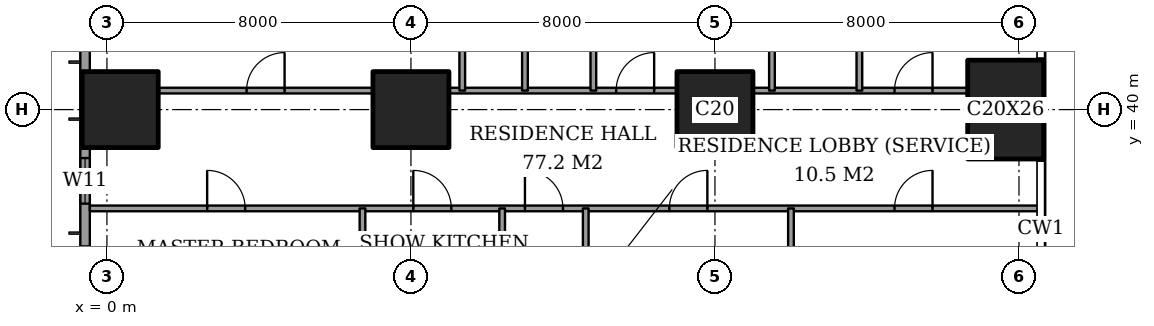
"""IFC4 building model, lengths in metres.
Left out: names, types, materials, properties, quantities, classifications, styles, units other than length and angle.
Written with IfcOpenShell. Run it as: python <this file> out.ifc"""

import sys

from ifc_helpers import new_model, si_unit, direction, frame, frame_2d, origin, origin_2d, place, context, subcontext, project, spatial, rectangle, extrude, element, fill, save


model = new_model("IFC4")
c1 = context("Model", 3, precision=1e-05, world=origin(), true_north=direction((0.0, 1.0)))
c2 = subcontext(c1, "Body", "Model", "MODEL_VIEW")
j1 = project(units=[si_unit("LENGTHUNIT", "METRE"), si_unit("PLANEANGLEUNIT", "RADIAN")], contexts=[c1])
p1 = place(None, origin())
s1 = spatial("IfcSite", under=j1, at=p1, CompositionType="ELEMENT")
p2 = place(p1, origin())
s2 = spatial("IfcBuilding", under=s1, at=p2, CompositionType="ELEMENT")
p3 = place(p2, frame((0.0, 0.0, 168.2)))
s3 = spatial("IfcBuildingStorey", under=s2, at=p3, CompositionType="ELEMENT", Elevation=168.2)
for number, where, z_axis, x_axis in (
    (1, (0.35, 40.0, 0.0), (0.0, 0.0, 1.0), (1.0, 0.0, 0.0)),
    (2, (8.0, 40.0, 0.0), (0.0, 0.0, 1.0), (1.0, 0.0, 0.0)),
    (3, (16.0, 40.0, 0.0), (0.0, 0.0, 1.0), (1.0, 0.0, 0.0)),
):
    element("IfcColumn", number, at=place(p3, frame(where, z_axis=z_axis, x_axis=x_axis)), inside=s3, PredefinedType="COLUMN", context=c2, shape_type="SweptSolid", body=[
        extrude(rectangle(XDim=2.0, YDim=2.0, at=origin_2d()), origin(), (0.0, 0.0, 1.0), 3.6),
    ])
p4 = place(p3, frame((23.65, 40.0, 0.0), z_axis=(0.0, 0.0, 1.0), x_axis=(1.0, 0.0, 0.0)))
e4 = element("IfcColumn", 4, at=p4, inside=s3, PredefinedType="COLUMN", context=c2, shape_type="SweptSolid", body=[
    extrude(rectangle(XDim=2.0, YDim=2.6, at=origin_2d()), origin(), (0.0, 0.0, 1.0), 3.6),
])
p5 = place(p3, frame((-0.575, 44.825, 0.0), z_axis=(0.0, 0.0, 1.0), x_axis=(0.0, -1.0, 0.0)))
e5 = element("IfcWall", 5, at=p5, inside=s3, PredefinedType="SOLIDWALL", context=c2, shape_type="SweptSolid", body=[
    extrude(rectangle(XDim=41.65, YDim=0.25, at=frame_2d((20.825, 0.0))), origin(), (0.0, 0.0, 1.0), 3.6),
])
p6 = place(p5, frame((0.775, 0.0, 0.4)))
e6 = element("IfcOpeningElement", 6, at=p6, cuts=e5, PredefinedType="OPENING", context=c2, shape_type="SweptSolid", body=[
    extrude(rectangle(XDim=2.4, YDim=2.2, at=frame_2d((1.2, 1.1))), frame((0.0, 0.135, 0.0), z_axis=(0.0, -1.0, 0.0), x_axis=(1.0, 0.0, 0.0)), (0.0, 0.0, 1.0), 0.27),
])
p7 = place(p5, frame((6.1, 0.0, 0.4)))
e7 = element("IfcOpeningElement", 7, at=p7, cuts=e5, PredefinedType="OPENING", context=c2, shape_type="SweptSolid", body=[
    extrude(rectangle(XDim=1.2, YDim=2.2, at=frame_2d((0.6, 1.1))), frame((0.0, 0.135, 0.0), z_axis=(0.0, -1.0, 0.0), x_axis=(1.0, 0.0, 0.0)), (0.0, 0.0, 1.0), 0.27),
])
p8 = place(p5, frame((8.425, 0.0, 0.4)))
e8 = element("IfcOpeningElement", 8, at=p8, cuts=e5, PredefinedType="OPENING", context=c2, shape_type="SweptSolid", body=[
    extrude(rectangle(XDim=2.4, YDim=2.2, at=frame_2d((1.2, 1.1))), frame((0.0, 0.135, 0.0), z_axis=(0.0, -1.0, 0.0), x_axis=(1.0, 0.0, 0.0)), (0.0, 0.0, 1.0), 0.27),
])
p9 = place(p5, frame((15.625, 0.0, 0.4)))
e9 = element("IfcOpeningElement", 9, at=p9, cuts=e5, PredefinedType="OPENING", context=c2, shape_type="SweptSolid", body=[
    extrude(rectangle(XDim=2.4, YDim=2.2, at=frame_2d((1.2, 1.1))), frame((0.0, 0.135, 0.0), z_axis=(0.0, -1.0, 0.0), x_axis=(1.0, 0.0, 0.0)), (0.0, 0.0, 1.0), 0.27),
])
p10 = place(p5, frame((23.625, 0.0, 0.4)))
e10 = element("IfcOpeningElement", 10, at=p10, cuts=e5, PredefinedType="OPENING", context=c2, shape_type="SweptSolid", body=[
    extrude(rectangle(XDim=2.4, YDim=2.2, at=frame_2d((1.2, 1.1))), frame((0.0, 0.135, 0.0), z_axis=(0.0, -1.0, 0.0), x_axis=(1.0, 0.0, 0.0)), (0.0, 0.0, 1.0), 0.27),
])
p11 = place(p5, frame((30.825, 0.0, 0.4)))
e11 = element("IfcOpeningElement", 11, at=p11, cuts=e5, PredefinedType="OPENING", context=c2, shape_type="SweptSolid", body=[
    extrude(rectangle(XDim=2.4, YDim=2.2, at=frame_2d((1.2, 1.1))), frame((0.0, 0.135, 0.0), z_axis=(0.0, -1.0, 0.0), x_axis=(1.0, 0.0, 0.0)), (0.0, 0.0, 1.0), 0.27),
])
p12 = place(p5, frame((34.5, 0.0, 0.4)))
e12 = element("IfcOpeningElement", 12, at=p12, cuts=e5, PredefinedType="OPENING", context=c2, shape_type="SweptSolid", body=[
    extrude(rectangle(XDim=1.2, YDim=2.2, at=frame_2d((0.6, 1.1))), frame((0.0, 0.135, 0.0), z_axis=(0.0, -1.0, 0.0), x_axis=(1.0, 0.0, 0.0)), (0.0, 0.0, 1.0), 0.27),
])
p13 = place(p5, frame((38.475, 0.0, 0.4)))
e13 = element("IfcOpeningElement", 13, at=p13, cuts=e5, PredefinedType="OPENING", context=c2, shape_type="SweptSolid", body=[
    extrude(rectangle(XDim=2.4, YDim=2.2, at=frame_2d((1.2, 1.1))), frame((0.0, 0.135, 0.0), z_axis=(0.0, -1.0, 0.0), x_axis=(1.0, 0.0, 0.0)), (0.0, 0.0, 1.0), 0.27),
])
p14 = place(p3, frame((-0.45, 37.4, 0.0), z_axis=(0.0, 0.0, 1.0), x_axis=(1.0, 0.0, 0.0)))
e14 = element("IfcWall", 14, at=p14, inside=s3, PredefinedType="PARTITIONING", context=c2, shape_type="SweptSolid", body=[
    extrude(rectangle(XDim=25.011, YDim=0.15, at=frame_2d((12.505, 0.0))), origin(), (0.0, 0.0, 1.0), 3.25),
])
p15 = place(p14, frame((11.45, 0.0, 0.0)))
e15 = element("IfcOpeningElement", 15, at=p15, cuts=e14, PredefinedType="OPENING", context=c2, shape_type="SweptSolid", body=[
    extrude(rectangle(XDim=1.0, YDim=2.1, at=frame_2d((0.5, 1.05))), frame((0.0, 0.085, 0.0), z_axis=(0.0, -1.0, 0.0), x_axis=(1.0, 0.0, 0.0)), (0.0, 0.0, 1.0), 0.17),
])
p16 = place(p14, frame((3.087, 0.0, 0.0)))
e16 = element("IfcOpeningElement", 16, at=p16, cuts=e14, PredefinedType="OPENING", context=c2, shape_type="SweptSolid", body=[
    extrude(rectangle(XDim=1.0, YDim=2.1, at=frame_2d((0.5, 1.05))), frame((0.0, 0.085, 0.0), z_axis=(0.0, -1.0, 0.0), x_axis=(1.0, 0.0, 0.0)), (0.0, 0.0, 1.0), 0.17),
])
p17 = place(p14, frame((8.512, 0.0, 0.0)))
e17 = element("IfcOpeningElement", 17, at=p17, cuts=e14, PredefinedType="OPENING", context=c2, shape_type="SweptSolid", body=[
    extrude(rectangle(XDim=1.0, YDim=2.1, at=frame_2d((0.5, 1.05))), frame((0.0, 0.085, 0.0), z_axis=(0.0, -1.0, 0.0), x_axis=(1.0, 0.0, 0.0)), (0.0, 0.0, 1.0), 0.17),
])
p18 = place(p14, frame((15.25, 0.0, 0.0)))
e18 = element("IfcOpeningElement", 18, at=p18, cuts=e14, PredefinedType="OPENING", context=c2, shape_type="SweptSolid", body=[
    extrude(rectangle(XDim=1.0, YDim=2.1, at=frame_2d((0.5, 1.05))), frame((0.0, 0.085, 0.0), z_axis=(0.0, -1.0, 0.0), x_axis=(1.0, 0.0, 0.0)), (0.0, 0.0, 1.0), 0.17),
])
p19 = place(p14, frame((21.175, 0.0, 0.0)))
e19 = element("IfcOpeningElement", 19, at=p19, cuts=e14, PredefinedType="OPENING", context=c2, shape_type="SweptSolid", body=[
    extrude(rectangle(XDim=1.0, YDim=2.1, at=frame_2d((0.5, 1.05))), frame((0.0, 0.085, 0.0), z_axis=(0.0, -1.0, 0.0), x_axis=(1.0, 0.0, 0.0)), (0.0, 0.0, 1.0), 0.17),
])
p20 = place(p3, frame((1.35, 40.5, 0.0), z_axis=(0.0, 0.0, 1.0), x_axis=(1.0, 0.0, 0.0)))
e20 = element("IfcWall", 20, at=p20, inside=s3, PredefinedType="PARTITIONING", context=c2, shape_type="SweptSolid", body=[
    extrude(rectangle(XDim=5.65, YDim=0.15, at=frame_2d((2.825, 0.0))), origin(), (0.0, 0.0, 1.0), 3.25),
])
p21 = place(p20, frame((2.325, 0.0, 0.0)))
e21 = element("IfcOpeningElement", 21, at=p21, cuts=e20, PredefinedType="OPENING", context=c2, shape_type="SweptSolid", body=[
    extrude(rectangle(XDim=1.0, YDim=2.1, at=frame_2d((0.5, 1.05))), frame((0.0, 0.085, 0.0), z_axis=(0.0, -1.0, 0.0), x_axis=(1.0, 0.0, 0.0)), (0.0, 0.0, 1.0), 0.17),
])
p22 = place(p3, frame((9.0, 40.5, 0.0), z_axis=(0.0, 0.0, 1.0), x_axis=(1.0, 0.0, 0.0)))
e22 = element("IfcWall", 22, at=p22, inside=s3, PredefinedType="PARTITIONING", context=c2, shape_type="SweptSolid", body=[
    extrude(rectangle(XDim=6.0, YDim=0.15, at=frame_2d((3.0, 0.0))), origin(), (0.0, 0.0, 1.0), 3.25),
])
p23 = place(p22, frame((4.4, 0.0, 0.0)))
e23 = element("IfcOpeningElement", 23, at=p23, cuts=e22, PredefinedType="OPENING", context=c2, shape_type="SweptSolid", body=[
    extrude(rectangle(XDim=1.0, YDim=2.1, at=frame_2d((0.5, 1.05))), frame((0.0, 0.085, 0.0), z_axis=(0.0, -1.0, 0.0), x_axis=(1.0, 0.0, 0.0)), (0.0, 0.0, 1.0), 0.17),
])
p24 = place(p3, frame((17.0, 40.5, 0.0), z_axis=(0.0, 0.0, 1.0), x_axis=(1.0, 0.0, 0.0)))
e24 = element("IfcWall", 24, at=p24, inside=s3, PredefinedType="PARTITIONING", context=c2, shape_type="SweptSolid", body=[
    extrude(rectangle(XDim=5.65, YDim=0.15, at=frame_2d((2.825, 0.0))), origin(), (0.0, 0.0, 1.0), 3.25),
])
p25 = place(p24, frame((3.725, 0.0, 0.0)))
e25 = element("IfcOpeningElement", 25, at=p25, cuts=e24, PredefinedType="OPENING", context=c2, shape_type="SweptSolid", body=[
    extrude(rectangle(XDim=1.0, YDim=2.1, at=frame_2d((0.5, 1.05))), frame((0.0, 0.085, 0.0), z_axis=(0.0, -1.0, 0.0), x_axis=(1.0, 0.0, 0.0)), (0.0, 0.0, 1.0), 0.17),
])
p26 = place(p3, frame((6.725, 33.2, 0.0), z_axis=(0.0, 0.0, 1.0), x_axis=(0.0, 1.0, 0.0)))
e26 = element("IfcWall", 26, at=p26, inside=s3, PredefinedType="PARTITIONING", context=c2, shape_type="SweptSolid", body=[
    extrude(rectangle(XDim=4.2, YDim=0.15, at=frame_2d((2.1, 0.0))), origin(), (0.0, 0.0, 1.0), 3.25),
])
p27 = place(p3, frame((9.35, 40.5, 0.0), z_axis=(0.0, 0.0, 1.0), x_axis=(0.0, 1.0, 0.0)))
e27 = element("IfcWall", 27, at=p27, inside=s3, PredefinedType="PARTITIONING", context=c2, shape_type="SweptSolid", body=[
    extrude(rectangle(XDim=7.95, YDim=0.15, at=frame_2d((3.975, 0.0))), origin(), (0.0, 0.0, 1.0), 3.25),
])
p28 = place(p27, frame((3.525, 0.0, 0.0)))
e28 = element("IfcOpeningElement", 28, at=p28, cuts=e27, PredefinedType="OPENING", context=c2, shape_type="SweptSolid", body=[
    extrude(rectangle(XDim=0.9, YDim=2.1, at=frame_2d((0.45, 1.05))), frame((0.0, 0.085, 0.0), z_axis=(0.0, -1.0, 0.0), x_axis=(1.0, 0.0, 0.0)), (0.0, 0.0, 1.0), 0.17),
])
p29 = place(p3, frame((10.4, 28.0, 0.0), z_axis=(0.0, 0.0, 1.0), x_axis=(0.0, 1.0, 0.0)))
e29 = element("IfcWall", 29, at=p29, inside=s3, PredefinedType="PARTITIONING", context=c2, shape_type="SweptSolid", body=[
    extrude(rectangle(XDim=9.4, YDim=0.15, at=frame_2d((4.7, 0.0))), origin(), (0.0, 0.0, 1.0), 3.25),
])
p30 = place(p29, frame((0.837, 0.0, 0.0)))
e30 = element("IfcOpeningElement", 30, at=p30, cuts=e29, PredefinedType="OPENING", context=c2, shape_type="SweptSolid", body=[
    extrude(rectangle(XDim=1.0, YDim=2.1, at=frame_2d((0.5, 1.05))), frame((0.0, 0.085, 0.0), z_axis=(0.0, -1.0, 0.0), x_axis=(1.0, 0.0, 0.0)), (0.0, 0.0, 1.0), 0.17),
])
p31 = place(p3, frame((11.0, 40.5, 0.0), z_axis=(0.0, 0.0, 1.0), x_axis=(0.0, 1.0, 0.0)))
e31 = element("IfcWall", 31, at=p31, inside=s3, PredefinedType="PARTITIONING", context=c2, shape_type="SweptSolid", body=[
    extrude(rectangle(XDim=7.95, YDim=0.15, at=frame_2d((3.975, 0.0))), origin(), (0.0, 0.0, 1.0), 3.25),
])
p32 = place(p3, frame((12.6, 30.675, 0.0), z_axis=(0.0, 0.0, 1.0), x_axis=(0.0, 1.0, 0.0)))
e32 = element("IfcWall", 32, at=p32, inside=s3, PredefinedType="PARTITIONING", context=c2, shape_type="SweptSolid", body=[
    extrude(rectangle(XDim=6.725, YDim=0.15, at=frame_2d((3.362, 0.0))), origin(), (0.0, 0.0, 1.0), 3.25),
])
p33 = place(p3, frame((12.8, 40.5, 0.0), z_axis=(0.0, 0.0, 1.0), x_axis=(0.0, 1.0, 0.0)))
e33 = element("IfcWall", 33, at=p33, inside=s3, PredefinedType="PARTITIONING", context=c2, shape_type="SweptSolid", body=[
    extrude(rectangle(XDim=7.95, YDim=0.15, at=frame_2d((3.975, 0.0))), origin(), (0.0, 0.0, 1.0), 3.25),
])
p34 = place(p33, frame((3.525, 0.0, 0.0)))
e34 = element("IfcOpeningElement", 34, at=p34, cuts=e33, PredefinedType="OPENING", context=c2, shape_type="SweptSolid", body=[
    extrude(rectangle(XDim=0.9, YDim=2.1, at=frame_2d((0.45, 1.05))), frame((0.0, 0.085, 0.0), z_axis=(0.0, -1.0, 0.0), x_axis=(1.0, 0.0, 0.0)), (0.0, 0.0, 1.0), 0.17),
])
p35 = place(p3, frame((17.5, 40.5, 0.0), z_axis=(0.0, 0.0, 1.0), x_axis=(0.0, 1.0, 0.0)))
e35 = element("IfcWall", 35, at=p35, inside=s3, PredefinedType="PARTITIONING", context=c2, shape_type="SweptSolid", body=[
    extrude(rectangle(XDim=7.95, YDim=0.15, at=frame_2d((3.975, 0.0))), origin(), (0.0, 0.0, 1.0), 3.25),
])
p36 = place(p3, frame((18.0, 33.5, 0.0), z_axis=(0.0, 0.0, 1.0), x_axis=(0.0, 1.0, 0.0)))
e36 = element("IfcWall", 36, at=p36, inside=s3, PredefinedType="PARTITIONING", context=c2, shape_type="SweptSolid", body=[
    extrude(rectangle(XDim=3.9, YDim=0.15, at=frame_2d((1.95, 0.0))), origin(), (0.0, 0.0, 1.0), 3.25),
])
p37 = place(p3, frame((19.8, 40.5, 0.0), z_axis=(0.0, 0.0, 1.0), x_axis=(0.0, 1.0, 0.0)))
e37 = element("IfcWall", 37, at=p37, inside=s3, PredefinedType="PARTITIONING", context=c2, shape_type="SweptSolid", body=[
    extrude(rectangle(XDim=7.95, YDim=0.15, at=frame_2d((3.975, 0.0))), origin(), (0.0, 0.0, 1.0), 3.25),
])
p38 = place(p37, frame((3.525, 0.0, 0.0)))
e38 = element("IfcOpeningElement", 38, at=p38, cuts=e37, PredefinedType="OPENING", context=c2, shape_type="SweptSolid", body=[
    extrude(rectangle(XDim=0.9, YDim=2.1, at=frame_2d((0.45, 1.05))), frame((0.0, 0.085, 0.0), z_axis=(0.0, -1.0, 0.0), x_axis=(1.0, 0.0, 0.0)), (0.0, 0.0, 1.0), 0.17),
])
p39 = place(p7, origin())
e39 = element("IfcWindow", 39, at=p39, inside=s3, PartitioningType="SINGLE_PANEL", PredefinedType="WINDOW", context=c2, shape_type="SweptSolid", body=[
    extrude(rectangle(XDim=1.2, YDim=2.2, at=frame_2d((0.6, 1.1))), frame((0.0, 0.03, 0.0), z_axis=(0.0, -1.0, 0.0), x_axis=(1.0, 0.0, 0.0)), (0.0, 0.0, 1.0), 0.06),
])
fill(e7, e39)
p40 = place(p21, origin())
e40 = element("IfcDoor", 40, at=p40, inside=s3, OperationType="SINGLE_SWING_LEFT", PredefinedType="DOOR", context=c2, shape_type="SweptSolid", body=[
    extrude(rectangle(XDim=1.0, YDim=2.1, at=frame_2d((0.5, 1.05))), frame((0.0, 0.025, 0.0), z_axis=(0.0, -1.0, 0.0), x_axis=(1.0, 0.0, 0.0)), (0.0, 0.0, 1.0), 0.05),
])
fill(e21, e40)
p41 = place(p23, origin())
e41 = element("IfcDoor", 41, at=p41, inside=s3, OperationType="SINGLE_SWING_LEFT", PredefinedType="DOOR", context=c2, shape_type="SweptSolid", body=[
    extrude(rectangle(XDim=1.0, YDim=2.1, at=frame_2d((0.5, 1.05))), frame((0.0, 0.025, 0.0), z_axis=(0.0, -1.0, 0.0), x_axis=(1.0, 0.0, 0.0)), (0.0, 0.0, 1.0), 0.05),
])
fill(e23, e41)
p42 = place(p25, origin())
e42 = element("IfcDoor", 42, at=p42, inside=s3, OperationType="SINGLE_SWING_LEFT", PredefinedType="DOOR", context=c2, shape_type="SweptSolid", body=[
    extrude(rectangle(XDim=1.0, YDim=2.1, at=frame_2d((0.5, 1.05))), frame((0.0, 0.025, 0.0), z_axis=(0.0, -1.0, 0.0), x_axis=(1.0, 0.0, 0.0)), (0.0, 0.0, 1.0), 0.05),
])
fill(e25, e42)
p43 = place(p15, origin())
e43 = element("IfcDoor", 43, at=p43, inside=s3, OperationType="SINGLE_SWING_RIGHT", PredefinedType="DOOR", context=c2, shape_type="SweptSolid", body=[
    extrude(rectangle(XDim=1.0, YDim=2.1, at=frame_2d((0.5, 1.05))), frame((0.0, 0.025, 0.0), z_axis=(0.0, -1.0, 0.0), x_axis=(1.0, 0.0, 0.0)), (0.0, 0.0, 1.0), 0.05),
])
fill(e15, e43)
p44 = place(p16, origin())
e44 = element("IfcDoor", 44, at=p44, inside=s3, OperationType="SINGLE_SWING_RIGHT", PredefinedType="DOOR", context=c2, shape_type="SweptSolid", body=[
    extrude(rectangle(XDim=1.0, YDim=2.1, at=frame_2d((0.5, 1.05))), frame((0.0, 0.025, 0.0), z_axis=(0.0, -1.0, 0.0), x_axis=(1.0, 0.0, 0.0)), (0.0, 0.0, 1.0), 0.05),
])
fill(e16, e44)
p45 = place(p17, origin())
e45 = element("IfcDoor", 45, at=p45, inside=s3, OperationType="SINGLE_SWING_RIGHT", PredefinedType="DOOR", context=c2, shape_type="SweptSolid", body=[
    extrude(rectangle(XDim=1.0, YDim=2.1, at=frame_2d((0.5, 1.05))), frame((0.0, 0.025, 0.0), z_axis=(0.0, -1.0, 0.0), x_axis=(1.0, 0.0, 0.0)), (0.0, 0.0, 1.0), 0.05),
])
fill(e17, e45)
p46 = place(p18, origin())
e46 = element("IfcDoor", 46, at=p46, inside=s3, OperationType="SINGLE_SWING_LEFT", PredefinedType="DOOR", context=c2, shape_type="SweptSolid", body=[
    extrude(rectangle(XDim=1.0, YDim=2.1, at=frame_2d((0.5, 1.05))), frame((0.0, 0.025, 0.0), z_axis=(0.0, -1.0, 0.0), x_axis=(1.0, 0.0, 0.0)), (0.0, 0.0, 1.0), 0.05),
])
fill(e18, e46)
p47 = place(p19, origin())
e47 = element("IfcDoor", 47, at=p47, inside=s3, OperationType="SINGLE_SWING_LEFT", PredefinedType="DOOR", context=c2, shape_type="SweptSolid", body=[
    extrude(rectangle(XDim=1.0, YDim=2.1, at=frame_2d((0.5, 1.05))), frame((0.0, 0.025, 0.0), z_axis=(0.0, -1.0, 0.0), x_axis=(1.0, 0.0, 0.0)), (0.0, 0.0, 1.0), 0.05),
])
fill(e19, e47)
save(model, sys.argv[1])
